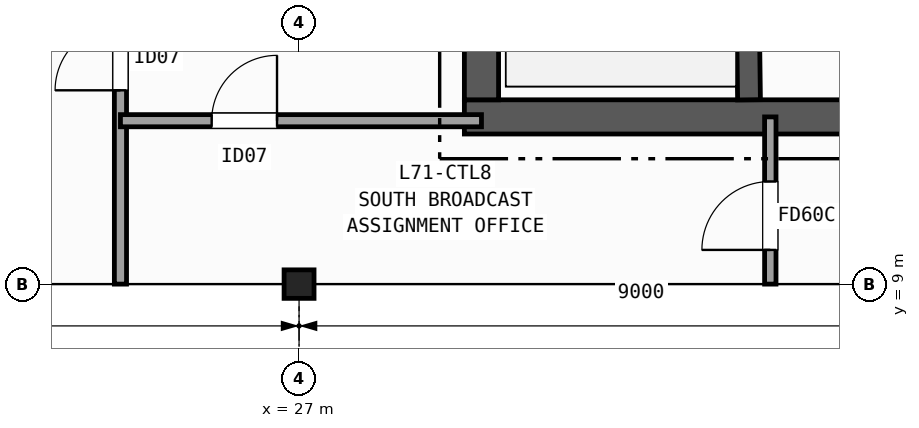
"""IFC4 building model, lengths in metres.
Left out: names, types, materials, properties, quantities, classifications, styles, units other than length and angle.
Written with IfcOpenShell. Run it as: python <this file> out.ifc"""

import sys

from ifc_helpers import new_model, si_unit, direction, frame, frame_2d, origin, origin_2d, place, context, subcontext, project, spatial, rectangle, i_section, extrude, element, fill, save


model = new_model("IFC4")
c1 = context("Model", 3, precision=1e-05, world=origin(), true_north=direction((0.0, 1.0)))
c2 = subcontext(c1, "Body", "Model", "MODEL_VIEW")
j1 = project(units=[si_unit("LENGTHUNIT", "METRE"), si_unit("PLANEANGLEUNIT", "RADIAN")], contexts=[c1])
p1 = place(None, origin())
s1 = spatial("IfcSite", under=j1, at=p1, CompositionType="ELEMENT")
p2 = place(p1, origin())
s2 = spatial("IfcBuilding", under=s1, at=p2, CompositionType="ELEMENT")
p3 = place(p2, frame((0.0, 0.0, 281.5)))
s3 = spatial("IfcBuildingStorey", under=s2, at=p3, CompositionType="ELEMENT", Elevation=281.5)
p4 = place(p3, frame((27.0, 9.0, 0.0), z_axis=(0.0, 0.0, 1.0), x_axis=(1.0, 0.0, 0.0)))
e1 = element("IfcColumn", 1, at=p4, inside=s3, PredefinedType="COLUMN", context=c2, shape_type="SweptSolid", body=[
    extrude(i_section(OverallWidth=0.394, OverallDepth=0.375, WebThickness=0.017, FlangeThickness=0.028, FilletRadius=0.015, at=origin_2d()), origin(), (0.0, 0.0, 1.0), 3.7),
])
p5 = place(p3, frame((29.175, 11.2, 0.0), z_axis=(0.0, 0.0, 1.0), x_axis=(1.0, 0.0, 0.0)))
e2 = element("IfcWall", 2, at=p5, inside=s3, PredefinedType="SHEAR", context=c2, shape_type="SweptSolid", body=[
    extrude(rectangle(XDim=13.85, YDim=0.45, at=frame_2d((6.925, 0.0))), origin(), (0.0, 0.0, 1.0), 3.37),
])
p6 = place(p3, frame((29.4, 24.375, 0.0), z_axis=(0.0, 0.0, 1.0), x_axis=(0.0, -1.0, 0.0)))
e3 = element("IfcWall", 3, at=p6, inside=s3, PredefinedType="SHEAR", context=c2, shape_type="SweptSolid", body=[
    extrude(rectangle(XDim=12.95, YDim=0.45, at=frame_2d((6.475, 0.0))), origin(), (0.0, 0.0, 1.0), 3.37),
])
p7 = place(p6, frame((1.475, 0.0, 0.0)))
e4 = element("IfcOpeningElement", 4, at=p7, cuts=e3, PredefinedType="OPENING", context=c2, shape_type="SweptSolid", body=[
    extrude(rectangle(XDim=1.35, YDim=2.15, at=frame_2d((0.675, 1.075))), frame((0.0, 0.235, 0.0), z_axis=(0.0, -1.0, 0.0), x_axis=(1.0, 0.0, 0.0)), (0.0, 0.0, 1.0), 0.47),
])
p8 = place(p3, frame((32.92, 11.425, 0.0), z_axis=(0.0, 0.0, 1.0), x_axis=(-0.013135638869, 0.999913723774, 0.0)))
e5 = element("IfcWall", 5, at=p8, inside=s3, PredefinedType="SHEAR", context=c2, shape_type="SweptSolid", body=[
    extrude(rectangle(XDim=9.126, YDim=0.3, at=frame_2d((4.563, 0.0))), origin(), (0.0, 0.0, 1.0), 3.37),
])
p9 = place(p3, frame((24.65, 9.0, 0.0), z_axis=(0.0, 0.0, 1.0), x_axis=(0.0, 1.0, 0.0)))
e6 = element("IfcWall", 6, at=p9, inside=s3, PredefinedType="PARTITIONING", context=c2, shape_type="SweptSolid", body=[
    extrude(rectangle(XDim=19.2, YDim=0.16, at=frame_2d((9.6, 0.0))), origin(), (0.0, 0.0, 1.0), 2.657),
])
p10 = place(p9, frame((15.2, 0.0, 0.0)))
e7 = element("IfcOpeningElement", 7, at=p10, cuts=e6, PredefinedType="OPENING", context=c2, shape_type="SweptSolid", body=[
    extrude(rectangle(XDim=1.0, YDim=2.1, at=frame_2d((0.5, 1.05))), frame((0.0, 0.09, 0.0), z_axis=(0.0, -1.0, 0.0), x_axis=(1.0, 0.0, 0.0)), (0.0, 0.0, 1.0), 0.18),
])
p11 = place(p9, frame((10.5, 0.0, 0.0)))
e8 = element("IfcOpeningElement", 8, at=p11, cuts=e6, PredefinedType="OPENING", context=c2, shape_type="SweptSolid", body=[
    extrude(rectangle(XDim=1.05, YDim=2.15, at=frame_2d((0.525, 1.075))), frame((0.0, 0.09, 0.0), z_axis=(0.0, -1.0, 0.0), x_axis=(1.0, 0.0, 0.0)), (0.0, 0.0, 1.0), 0.18),
])
p12 = place(p9, frame((6.0, 0.0, 0.0)))
e9 = element("IfcOpeningElement", 9, at=p12, cuts=e6, PredefinedType="OPENING", context=c2, shape_type="SweptSolid", body=[
    extrude(rectangle(XDim=1.2, YDim=2.15, at=frame_2d((0.6, 1.075))), frame((0.0, 0.09, 0.0), z_axis=(0.0, -1.0, 0.0), x_axis=(1.0, 0.0, 0.0)), (0.0, 0.0, 1.0), 0.18),
])
p13 = place(p9, frame((2.55, 0.0, 0.0)))
e10 = element("IfcOpeningElement", 10, at=p13, cuts=e6, PredefinedType="OPENING", context=c2, shape_type="SweptSolid", body=[
    extrude(rectangle(XDim=0.86, YDim=2.05, at=frame_2d((0.43, 1.025))), frame((0.0, 0.09, 0.0), z_axis=(0.0, -1.0, 0.0), x_axis=(1.0, 0.0, 0.0)), (0.0, 0.0, 1.0), 0.18),
])
p14 = place(p3, frame((24.65, 11.15, 0.0), z_axis=(0.0, 0.0, 1.0), x_axis=(1.0, 0.0, 0.0)))
e11 = element("IfcWall", 11, at=p14, inside=s3, PredefinedType="PARTITIONING", context=c2, shape_type="SweptSolid", body=[
    extrude(rectangle(XDim=4.75, YDim=0.16, at=frame_2d((2.375, 0.0))), origin(), (0.0, 0.0, 1.0), 2.742),
])
p15 = place(p14, frame((1.2, 0.0, 0.0)))
e12 = element("IfcOpeningElement", 12, at=p15, cuts=e11, PredefinedType="OPENING", context=c2, shape_type="SweptSolid", body=[
    extrude(rectangle(XDim=0.86, YDim=2.05, at=frame_2d((0.43, 1.025))), frame((0.0, 0.09, 0.0), z_axis=(0.0, -1.0, 0.0), x_axis=(1.0, 0.0, 0.0)), (0.0, 0.0, 1.0), 0.18),
])
p16 = place(p3, frame((33.2, 9.0, 0.0), z_axis=(0.0, 0.0, 1.0), x_axis=(0.0, 1.0, 0.0)))
e13 = element("IfcWall", 13, at=p16, inside=s3, PredefinedType="PARTITIONING", context=c2, shape_type="SweptSolid", body=[
    extrude(rectangle(XDim=2.2, YDim=0.15, at=frame_2d((1.1, 0.0))), origin(), (0.0, 0.0, 1.0), 2.657),
])
p17 = place(p16, frame((0.45, 0.0, 0.0)))
e14 = element("IfcOpeningElement", 14, at=p17, cuts=e13, PredefinedType="OPENING", context=c2, shape_type="SweptSolid", body=[
    extrude(rectangle(XDim=0.9, YDim=2.1, at=frame_2d((0.45, 1.05))), frame((0.0, 0.085, 0.0), z_axis=(0.0, -1.0, 0.0), x_axis=(1.0, 0.0, 0.0)), (0.0, 0.0, 1.0), 0.17),
])
p18 = place(p13, origin())
e15 = element("IfcDoor", 15, at=p18, inside=s3, OperationType="SINGLE_SWING_LEFT", PredefinedType="DOOR", context=c2, shape_type="SweptSolid", body=[
    extrude(rectangle(XDim=0.86, YDim=2.05, at=frame_2d((0.43, 1.025))), frame((0.0, 0.025, 0.0), z_axis=(0.0, -1.0, 0.0), x_axis=(1.0, 0.0, 0.0)), (0.0, 0.0, 1.0), 0.05),
])
fill(e10, e15)
p19 = place(p15, origin())
e16 = element("IfcDoor", 16, at=p19, inside=s3, OperationType="SINGLE_SWING_RIGHT", PredefinedType="DOOR", context=c2, shape_type="SweptSolid", body=[
    extrude(rectangle(XDim=0.86, YDim=2.05, at=frame_2d((0.43, 1.025))), frame((0.0, 0.025, 0.0), z_axis=(0.0, -1.0, 0.0), x_axis=(1.0, 0.0, 0.0)), (0.0, 0.0, 1.0), 0.05),
])
fill(e12, e16)
p20 = place(p17, origin())
e17 = element("IfcDoor", 17, at=p20, inside=s3, OperationType="SINGLE_SWING_LEFT", PredefinedType="DOOR", context=c2, shape_type="SweptSolid", body=[
    extrude(rectangle(XDim=0.9, YDim=2.1, at=frame_2d((0.45, 1.05))), frame((0.0, 0.025, 0.0), z_axis=(0.0, -1.0, 0.0), x_axis=(1.0, 0.0, 0.0)), (0.0, 0.0, 1.0), 0.05),
])
fill(e14, e17)
save(model, sys.argv[1])
